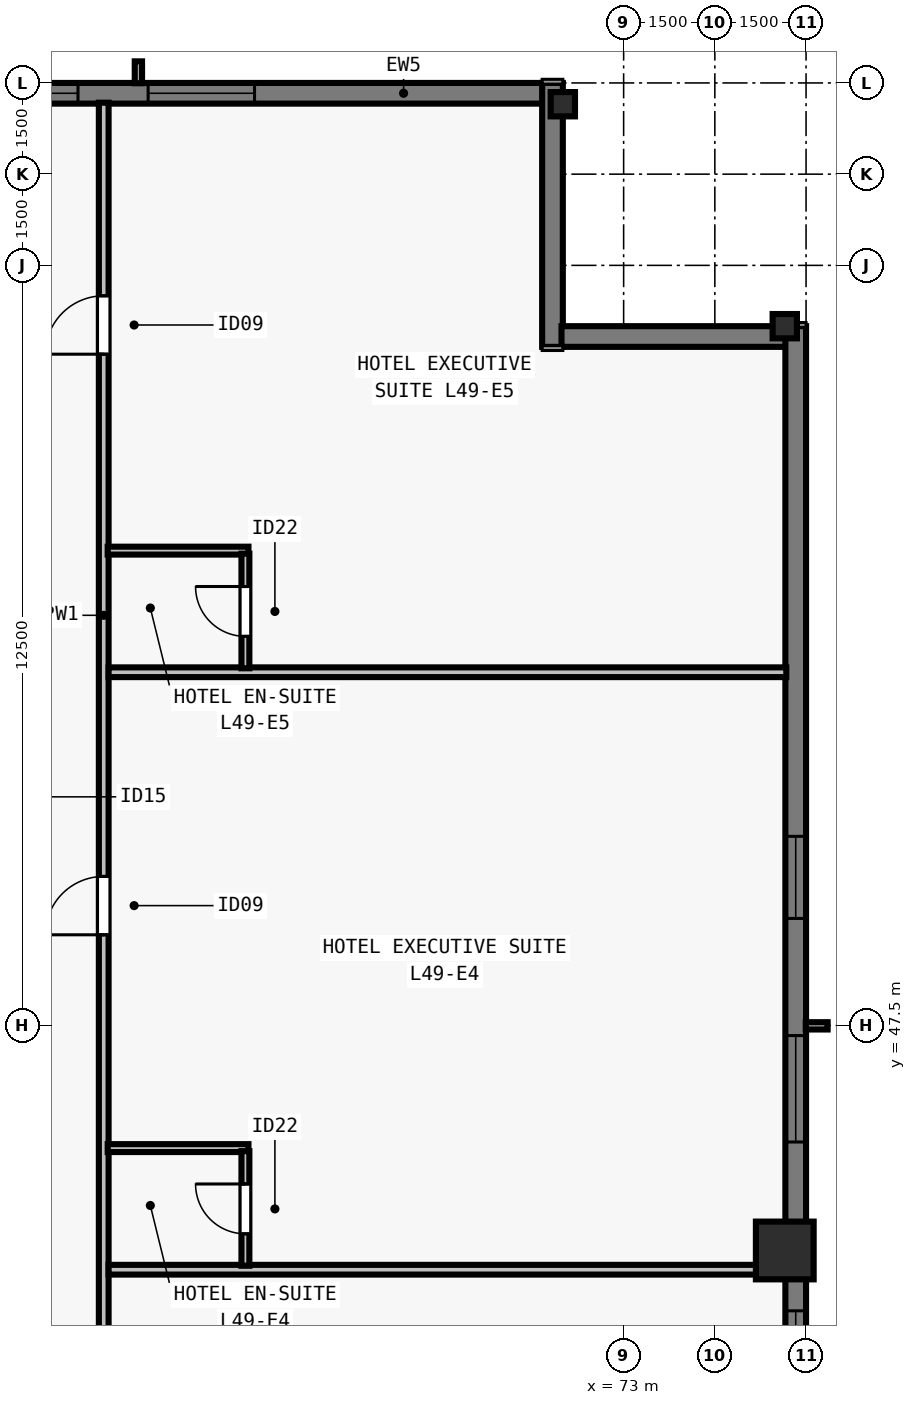
"""IFC4 building model, lengths in metres.
Left out: names, types, materials, properties, quantities, classifications, styles, units other than length and angle.
Written with IfcOpenShell. Run it as: python <this file> out.ifc"""

import sys

from ifc_helpers import new_model, si_unit, direction, frame, frame_2d, origin, origin_2d, place, context, subcontext, project, spatial, rectangle, i_section, extrude, element, fill, save


model = new_model("IFC4")
c1 = context("Model", 3, precision=1e-05, world=origin(), true_north=direction((0.0, 1.0)))
c2 = subcontext(c1, "Body", "Model", "MODEL_VIEW")
j1 = project(units=[si_unit("LENGTHUNIT", "METRE"), si_unit("PLANEANGLEUNIT", "RADIAN")], contexts=[c1])
p1 = place(None, origin())
s1 = spatial("IfcSite", under=j1, at=p1, CompositionType="ELEMENT")
p2 = place(p1, origin())
s2 = spatial("IfcBuilding", under=s1, at=p2, CompositionType="ELEMENT")
p3 = place(p2, frame((0.0, 0.0, 179.5)))
s3 = spatial("IfcBuildingStorey", under=s2, at=p3, CompositionType="ELEMENT", Elevation=179.5)
p4 = place(p3, frame((75.65, 43.8, 0.0), z_axis=(0.0, 0.0, 1.0), x_axis=(0.0, 1.0, 0.0)))
e1 = element("IfcColumn", 1, at=p4, inside=s3, PredefinedType="COLUMN", context=c2, shape_type="SweptSolid", body=[
    extrude(rectangle(XDim=0.95, YDim=0.95, at=origin_2d()), origin(), (0.0, 0.0, 1.0), 3.5),
])
for number, where, z_axis, x_axis in (
    (2, (75.65, 59.0, 0.0), (0.0, 0.0, 1.0), (0.0, 1.0, 0.0)),
    (3, (72.0, 62.65, 0.0), (0.0, 0.0, 1.0), (1.0, 0.0, 0.0)),
):
    element("IfcColumn", number, at=place(p3, frame(where, z_axis=z_axis, x_axis=x_axis)), inside=s3, PredefinedType="COLUMN", context=c2, shape_type="SweptSolid", body=[
        extrude(i_section(OverallWidth=0.4, OverallDepth=0.4, WebThickness=0.022, FlangeThickness=0.036, at=origin_2d()), origin(), (0.0, 0.0, 1.0), 3.5),
    ])
p5 = place(p3, frame((32.0, 62.83, 0.0), z_axis=(0.0, 0.0, 1.0), x_axis=(1.0, 0.0, 0.0)))
e4 = element("IfcWall", 4, at=p5, inside=s3, PredefinedType="SOLIDWALL", context=c2, shape_type="SweptSolid", body=[
    extrude(rectangle(XDim=39.682, YDim=0.34, at=frame_2d((19.841, 0.0))), origin(), (0.0, 0.0, 1.0), 3.28),
])
p6 = place(p5, frame((3.902, 0.0, 0.8)))
e5 = element("IfcOpeningElement", 5, at=p6, cuts=e4, PredefinedType="OPENING", context=c2, shape_type="SweptSolid", body=[
    extrude(rectangle(XDim=1.75, YDim=1.66, at=frame_2d((0.875, 0.83))), frame((0.0, 0.18, 0.0), z_axis=(0.0, -1.0, 0.0), x_axis=(1.0, 0.0, 0.0)), (0.0, 0.0, 1.0), 0.36),
])
p7 = place(p5, frame((8.505, 0.0, 0.8)))
e6 = element("IfcOpeningElement", 6, at=p7, cuts=e4, PredefinedType="OPENING", context=c2, shape_type="SweptSolid", body=[
    extrude(rectangle(XDim=1.35, YDim=1.66, at=frame_2d((0.675, 0.83))), frame((0.0, 0.18, 0.0), z_axis=(0.0, -1.0, 0.0), x_axis=(1.0, 0.0, 0.0)), (0.0, 0.0, 1.0), 0.36),
])
p8 = place(p5, frame((11.859, 0.0, 0.8)))
e7 = element("IfcOpeningElement", 7, at=p8, cuts=e4, PredefinedType="OPENING", context=c2, shape_type="SweptSolid", body=[
    extrude(rectangle(XDim=1.75, YDim=1.66, at=frame_2d((0.875, 0.83))), frame((0.0, 0.18, 0.0), z_axis=(0.0, -1.0, 0.0), x_axis=(1.0, 0.0, 0.0)), (0.0, 0.0, 1.0), 0.36),
])
p9 = place(p5, frame((16.062, 0.0, 0.8)))
e8 = element("IfcOpeningElement", 8, at=p9, cuts=e4, PredefinedType="OPENING", context=c2, shape_type="SweptSolid", body=[
    extrude(rectangle(XDim=1.35, YDim=1.66, at=frame_2d((0.675, 0.83))), frame((0.0, 0.18, 0.0), z_axis=(0.0, -1.0, 0.0), x_axis=(1.0, 0.0, 0.0)), (0.0, 0.0, 1.0), 0.36),
])
p10 = place(p5, frame((17.716, 0.0, 0.8)))
e9 = element("IfcOpeningElement", 9, at=p10, cuts=e4, PredefinedType="OPENING", context=c2, shape_type="SweptSolid", body=[
    extrude(rectangle(XDim=1.75, YDim=1.66, at=frame_2d((0.875, 0.83))), frame((0.0, 0.18, 0.0), z_axis=(0.0, -1.0, 0.0), x_axis=(1.0, 0.0, 0.0)), (0.0, 0.0, 1.0), 0.36),
])
p11 = place(p5, frame((22.719, 0.0, 0.8)))
e10 = element("IfcOpeningElement", 10, at=p11, cuts=e4, PredefinedType="OPENING", context=c2, shape_type="SweptSolid", body=[
    extrude(rectangle(XDim=1.35, YDim=1.66, at=frame_2d((0.675, 0.83))), frame((0.0, 0.18, 0.0), z_axis=(0.0, -1.0, 0.0), x_axis=(1.0, 0.0, 0.0)), (0.0, 0.0, 1.0), 0.36),
])
p12 = place(p5, frame((26.073, 0.0, 0.8)))
e11 = element("IfcOpeningElement", 11, at=p12, cuts=e4, PredefinedType="OPENING", context=c2, shape_type="SweptSolid", body=[
    extrude(rectangle(XDim=1.75, YDim=1.66, at=frame_2d((0.875, 0.83))), frame((0.0, 0.18, 0.0), z_axis=(0.0, -1.0, 0.0), x_axis=(1.0, 0.0, 0.0)), (0.0, 0.0, 1.0), 0.36),
])
p13 = place(p5, frame((30.677, 0.0, 0.8)))
e12 = element("IfcOpeningElement", 12, at=p13, cuts=e4, PredefinedType="OPENING", context=c2, shape_type="SweptSolid", body=[
    extrude(rectangle(XDim=1.35, YDim=1.66, at=frame_2d((0.675, 0.83))), frame((0.0, 0.18, 0.0), z_axis=(0.0, -1.0, 0.0), x_axis=(1.0, 0.0, 0.0)), (0.0, 0.0, 1.0), 0.36),
])
p14 = place(p5, frame((33.18, 0.0, 0.8)))
e13 = element("IfcOpeningElement", 13, at=p14, cuts=e4, PredefinedType="OPENING", context=c2, shape_type="SweptSolid", body=[
    extrude(rectangle(XDim=1.75, YDim=1.66, at=frame_2d((0.875, 0.83))), frame((0.0, 0.18, 0.0), z_axis=(0.0, -1.0, 0.0), x_axis=(1.0, 0.0, 0.0)), (0.0, 0.0, 1.0), 0.36),
])
p15 = place(p3, frame((71.83, 63.0, 0.0), z_axis=(0.0, 0.0, 1.0), x_axis=(0.0, -1.0, 0.0)))
e14 = element("IfcWall", 14, at=p15, inside=s3, PredefinedType="SOLIDWALL", context=c2, shape_type="SweptSolid", body=[
    extrude(rectangle(XDim=4.34, YDim=0.34, at=frame_2d((2.17, 0.0))), origin(), (0.0, 0.0, 1.0), 3.28),
])
p16 = place(p3, frame((71.978, 58.83, 0.0), z_axis=(0.0, 0.0, 1.0), x_axis=(1.0, 0.0, 0.0)))
e15 = element("IfcWall", 15, at=p16, inside=s3, PredefinedType="SOLIDWALL", context=c2, shape_type="SweptSolid", body=[
    extrude(rectangle(XDim=3.704, YDim=0.34, at=frame_2d((1.852, 0.0))), origin(), (0.0, 0.0, 1.0), 3.28),
])
p17 = place(p3, frame((75.83, 59.0, 0.0), z_axis=(0.0, 0.0, 1.0), x_axis=(0.0, -1.0, 0.0)))
e16 = element("IfcWall", 16, at=p17, inside=s3, PredefinedType="SOLIDWALL", context=c2, shape_type="SweptSolid", body=[
    extrude(rectangle(XDim=25.082, YDim=0.34, at=frame_2d((12.541, 0.0))), origin(), (0.0, 0.0, 1.0), 3.28),
])
p18 = place(p17, frame((8.39, 0.0, 0.8)))
e17 = element("IfcOpeningElement", 17, at=p18, cuts=e16, PredefinedType="OPENING", context=c2, shape_type="SweptSolid", body=[
    extrude(rectangle(XDim=1.35, YDim=1.66, at=frame_2d((0.675, 0.83))), frame((0.0, 0.18, 0.0), z_axis=(0.0, -1.0, 0.0), x_axis=(1.0, 0.0, 0.0)), (0.0, 0.0, 1.0), 0.36),
])
p19 = place(p17, frame((11.666, 0.0, 0.8)))
e18 = element("IfcOpeningElement", 18, at=p19, cuts=e16, PredefinedType="OPENING", context=c2, shape_type="SweptSolid", body=[
    extrude(rectangle(XDim=1.75, YDim=1.66, at=frame_2d((0.875, 0.83))), frame((0.0, 0.18, 0.0), z_axis=(0.0, -1.0, 0.0), x_axis=(1.0, 0.0, 0.0)), (0.0, 0.0, 1.0), 0.36),
])
p20 = place(p17, frame((16.192, 0.0, 0.8)))
e19 = element("IfcOpeningElement", 19, at=p20, cuts=e16, PredefinedType="OPENING", context=c2, shape_type="SweptSolid", body=[
    extrude(rectangle(XDim=1.35, YDim=1.66, at=frame_2d((0.675, 0.83))), frame((0.0, 0.18, 0.0), z_axis=(0.0, -1.0, 0.0), x_axis=(1.0, 0.0, 0.0)), (0.0, 0.0, 1.0), 0.36),
])
p21 = place(p17, frame((18.619, 0.0, 0.8)))
e20 = element("IfcOpeningElement", 20, at=p21, cuts=e16, PredefinedType="OPENING", context=c2, shape_type="SweptSolid", body=[
    extrude(rectangle(XDim=1.75, YDim=1.66, at=frame_2d((0.875, 0.83))), frame((0.0, 0.18, 0.0), z_axis=(0.0, -1.0, 0.0), x_axis=(1.0, 0.0, 0.0)), (0.0, 0.0, 1.0), 0.36),
])
p22 = place(p3, frame((64.45, 15.325, 0.0), z_axis=(0.0, 0.0, 1.0), x_axis=(0.0, 1.0, 0.0)))
e21 = element("IfcWall", 21, at=p22, inside=s3, PredefinedType="PARTITIONING", context=c2, shape_type="SweptSolid", body=[
    extrude(rectangle(XDim=47.35, YDim=0.16, at=frame_2d((23.675, 0.0))), origin(), (0.0, 0.0, 1.0), 2.555),
])
p23 = place(p22, frame((5.515, 0.0, 0.0)))
e22 = element("IfcOpeningElement", 22, at=p23, cuts=e21, PredefinedType="OPENING", context=c2, shape_type="SweptSolid", body=[
    extrude(rectangle(XDim=0.96, YDim=2.15, at=frame_2d((0.48, 1.075))), frame((0.0, 0.09, 0.0), z_axis=(0.0, -1.0, 0.0), x_axis=(1.0, 0.0, 0.0)), (0.0, 0.0, 1.0), 0.18),
])
p24 = place(p22, frame((14.802, 0.0, 0.0)))
e23 = element("IfcOpeningElement", 23, at=p24, cuts=e21, PredefinedType="OPENING", context=c2, shape_type="SweptSolid", body=[
    extrude(rectangle(XDim=0.96, YDim=2.15, at=frame_2d((0.48, 1.075))), frame((0.0, 0.09, 0.0), z_axis=(0.0, -1.0, 0.0), x_axis=(1.0, 0.0, 0.0)), (0.0, 0.0, 1.0), 0.18),
])
p25 = place(p22, frame((24.234, 0.0, 0.0)))
e24 = element("IfcOpeningElement", 24, at=p25, cuts=e21, PredefinedType="OPENING", context=c2, shape_type="SweptSolid", body=[
    extrude(rectangle(XDim=0.96, YDim=2.15, at=frame_2d((0.48, 1.075))), frame((0.0, 0.09, 0.0), z_axis=(0.0, -1.0, 0.0), x_axis=(1.0, 0.0, 0.0)), (0.0, 0.0, 1.0), 0.18),
])
p26 = place(p22, frame((33.666, 0.0, 0.0)))
e25 = element("IfcOpeningElement", 25, at=p26, cuts=e21, PredefinedType="OPENING", context=c2, shape_type="SweptSolid", body=[
    extrude(rectangle(XDim=0.96, YDim=2.15, at=frame_2d((0.48, 1.075))), frame((0.0, 0.09, 0.0), z_axis=(0.0, -1.0, 0.0), x_axis=(1.0, 0.0, 0.0)), (0.0, 0.0, 1.0), 0.18),
])
p27 = place(p22, frame((43.214, 0.0, 0.0)))
e26 = element("IfcOpeningElement", 26, at=p27, cuts=e21, PredefinedType="OPENING", context=c2, shape_type="SweptSolid", body=[
    extrude(rectangle(XDim=0.96, YDim=2.15, at=frame_2d((0.48, 1.075))), frame((0.0, 0.09, 0.0), z_axis=(0.0, -1.0, 0.0), x_axis=(1.0, 0.0, 0.0)), (0.0, 0.0, 1.0), 0.18),
])
p28 = place(p3, frame((64.53, 43.484, 0.0), z_axis=(0.0, 0.0, 1.0), x_axis=(1.0, 0.0, 0.0)))
e27 = element("IfcWall", 27, at=p28, inside=s3, PredefinedType="PARTITIONING", context=c2, shape_type="SweptSolid", body=[
    extrude(rectangle(XDim=11.145, YDim=0.16, at=frame_2d((5.573, 0.0))), origin(), (0.0, 0.0, 1.0), 3.28),
])
p29 = place(p3, frame((64.515, 45.484, 0.0), z_axis=(0.0, 0.0, 1.0), x_axis=(1.0, 0.0, 0.0)))
e28 = element("IfcWall", 28, at=p29, inside=s3, PredefinedType="PLUMBINGWALL", context=c2, shape_type="SweptSolid", body=[
    extrude(rectangle(XDim=2.315, YDim=0.13, at=frame_2d((1.158, 0.0))), origin(), (0.0, 0.0, 1.0), 3.28),
])
p30 = place(p3, frame((66.78, 43.549, 0.0), z_axis=(0.0, 0.0, 1.0), x_axis=(0.0, 1.0, 0.0)))
e29 = element("IfcWall", 29, at=p30, inside=s3, PredefinedType="PLUMBINGWALL", context=c2, shape_type="SweptSolid", body=[
    extrude(rectangle(XDim=1.885, YDim=0.13, at=frame_2d((0.942, 0.0))), origin(), (0.0, 0.0, 1.0), 3.28),
])
p31 = place(p30, frame((0.525, 0.0, 0.0)))
e30 = element("IfcOpeningElement", 30, at=p31, cuts=e29, PredefinedType="OPENING", context=c2, shape_type="SweptSolid", body=[
    extrude(rectangle(XDim=0.82, YDim=2.1, at=frame_2d((0.41, 1.05))), frame((0.0, 0.075, 0.0), z_axis=(0.0, -1.0, 0.0), x_axis=(1.0, 0.0, 0.0)), (0.0, 0.0, 1.0), 0.15),
])
p32 = place(p3, frame((64.53, 53.309, 0.0), z_axis=(0.0, 0.0, 1.0), x_axis=(1.0, 0.0, 0.0)))
e31 = element("IfcWall", 31, at=p32, inside=s3, PredefinedType="PARTITIONING", context=c2, shape_type="SweptSolid", body=[
    extrude(rectangle(XDim=11.145, YDim=0.16, at=frame_2d((5.573, 0.0))), origin(), (0.0, 0.0, 1.0), 2.896),
])
p33 = place(p3, frame((64.515, 55.309, 0.0), z_axis=(0.0, 0.0, 1.0), x_axis=(1.0, 0.0, 0.0)))
e32 = element("IfcWall", 32, at=p33, inside=s3, PredefinedType="PLUMBINGWALL", context=c2, shape_type="SweptSolid", body=[
    extrude(rectangle(XDim=2.315, YDim=0.13, at=frame_2d((1.158, 0.0))), origin(), (0.0, 0.0, 1.0), 3.28),
])
p34 = place(p3, frame((66.78, 53.374, 0.0), z_axis=(0.0, 0.0, 1.0), x_axis=(0.0, 1.0, 0.0)))
e33 = element("IfcWall", 33, at=p34, inside=s3, PredefinedType="PLUMBINGWALL", context=c2, shape_type="SweptSolid", body=[
    extrude(rectangle(XDim=1.885, YDim=0.13, at=frame_2d((0.942, 0.0))), origin(), (0.0, 0.0, 1.0), 3.28),
])
p35 = place(p34, frame((0.525, 0.0, 0.0)))
e34 = element("IfcOpeningElement", 34, at=p35, cuts=e33, PredefinedType="OPENING", context=c2, shape_type="SweptSolid", body=[
    extrude(rectangle(XDim=0.82, YDim=2.1, at=frame_2d((0.41, 1.05))), frame((0.0, 0.075, 0.0), z_axis=(0.0, -1.0, 0.0), x_axis=(1.0, 0.0, 0.0)), (0.0, 0.0, 1.0), 0.15),
])
p36 = place(p13, origin())
e35 = element("IfcWindow", 35, at=p36, inside=s3, PartitioningType="SINGLE_PANEL", PredefinedType="WINDOW", context=c2, shape_type="SweptSolid", body=[
    extrude(rectangle(XDim=1.35, YDim=1.66, at=frame_2d((0.675, 0.83))), frame((0.0, -0.05, 0.0), z_axis=(0.0, -1.0, 0.0), x_axis=(1.0, 0.0, 0.0)), (0.0, 0.0, 1.0), 0.06),
])
fill(e12, e35)
p37 = place(p14, origin())
e36 = element("IfcWindow", 36, at=p37, inside=s3, PartitioningType="SINGLE_PANEL", PredefinedType="WINDOW", context=c2, shape_type="SweptSolid", body=[
    extrude(rectangle(XDim=1.75, YDim=1.66, at=frame_2d((0.875, 0.83))), frame((0.0, -0.05, 0.0), z_axis=(0.0, -1.0, 0.0), x_axis=(1.0, 0.0, 0.0)), (0.0, 0.0, 1.0), 0.06),
])
fill(e13, e36)
p38 = place(p18, origin())
e37 = element("IfcWindow", 37, at=p38, inside=s3, PartitioningType="SINGLE_PANEL", PredefinedType="WINDOW", context=c2, shape_type="SweptSolid", body=[
    extrude(rectangle(XDim=1.35, YDim=1.66, at=frame_2d((0.675, 0.83))), frame((0.0, -0.05, 0.0), z_axis=(0.0, -1.0, 0.0), x_axis=(1.0, 0.0, 0.0)), (0.0, 0.0, 1.0), 0.06),
])
fill(e17, e37)
p39 = place(p19, origin())
e38 = element("IfcWindow", 38, at=p39, inside=s3, PartitioningType="SINGLE_PANEL", PredefinedType="WINDOW", context=c2, shape_type="SweptSolid", body=[
    extrude(rectangle(XDim=1.75, YDim=1.66, at=frame_2d((0.875, 0.83))), frame((0.0, -0.05, 0.0), z_axis=(0.0, -1.0, 0.0), x_axis=(1.0, 0.0, 0.0)), (0.0, 0.0, 1.0), 0.06),
])
fill(e18, e38)
p40 = place(p20, origin())
e39 = element("IfcWindow", 39, at=p40, inside=s3, PartitioningType="SINGLE_PANEL", PredefinedType="WINDOW", context=c2, shape_type="SweptSolid", body=[
    extrude(rectangle(XDim=1.35, YDim=1.66, at=frame_2d((0.675, 0.83))), frame((0.0, -0.05, 0.0), z_axis=(0.0, -1.0, 0.0), x_axis=(1.0, 0.0, 0.0)), (0.0, 0.0, 1.0), 0.06),
])
fill(e19, e39)
p41 = place(p31, origin())
e40 = element("IfcDoor", 40, at=p41, inside=s3, OperationType="SINGLE_SWING_RIGHT", PredefinedType="DOOR", context=c2, shape_type="SweptSolid", body=[
    extrude(rectangle(XDim=0.82, YDim=2.1, at=frame_2d((0.41, 1.05))), frame((0.0, 0.025, 0.0), z_axis=(0.0, -1.0, 0.0), x_axis=(1.0, 0.0, 0.0)), (0.0, 0.0, 1.0), 0.05),
])
fill(e30, e40)
p42 = place(p26, origin())
e41 = element("IfcDoor", 41, at=p42, inside=s3, OperationType="SINGLE_SWING_LEFT", PredefinedType="DOOR", context=c2, shape_type="SweptSolid", body=[
    extrude(rectangle(XDim=0.96, YDim=2.15, at=frame_2d((0.48, 1.075))), frame((0.0, 0.025, 0.0), z_axis=(0.0, -1.0, 0.0), x_axis=(1.0, 0.0, 0.0)), (0.0, 0.0, 1.0), 0.05),
])
fill(e25, e41)
p43 = place(p35, origin())
e42 = element("IfcDoor", 42, at=p43, inside=s3, OperationType="SINGLE_SWING_RIGHT", PredefinedType="DOOR", context=c2, shape_type="SweptSolid", body=[
    extrude(rectangle(XDim=0.82, YDim=2.1, at=frame_2d((0.41, 1.05))), frame((0.0, 0.025, 0.0), z_axis=(0.0, -1.0, 0.0), x_axis=(1.0, 0.0, 0.0)), (0.0, 0.0, 1.0), 0.05),
])
fill(e34, e42)
p44 = place(p27, origin())
e43 = element("IfcDoor", 43, at=p44, inside=s3, OperationType="SINGLE_SWING_LEFT", PredefinedType="DOOR", context=c2, shape_type="SweptSolid", body=[
    extrude(rectangle(XDim=0.96, YDim=2.15, at=frame_2d((0.48, 1.075))), frame((0.0, 0.025, 0.0), z_axis=(0.0, -1.0, 0.0), x_axis=(1.0, 0.0, 0.0)), (0.0, 0.0, 1.0), 0.05),
])
fill(e26, e43)
save(model, sys.argv[1])
